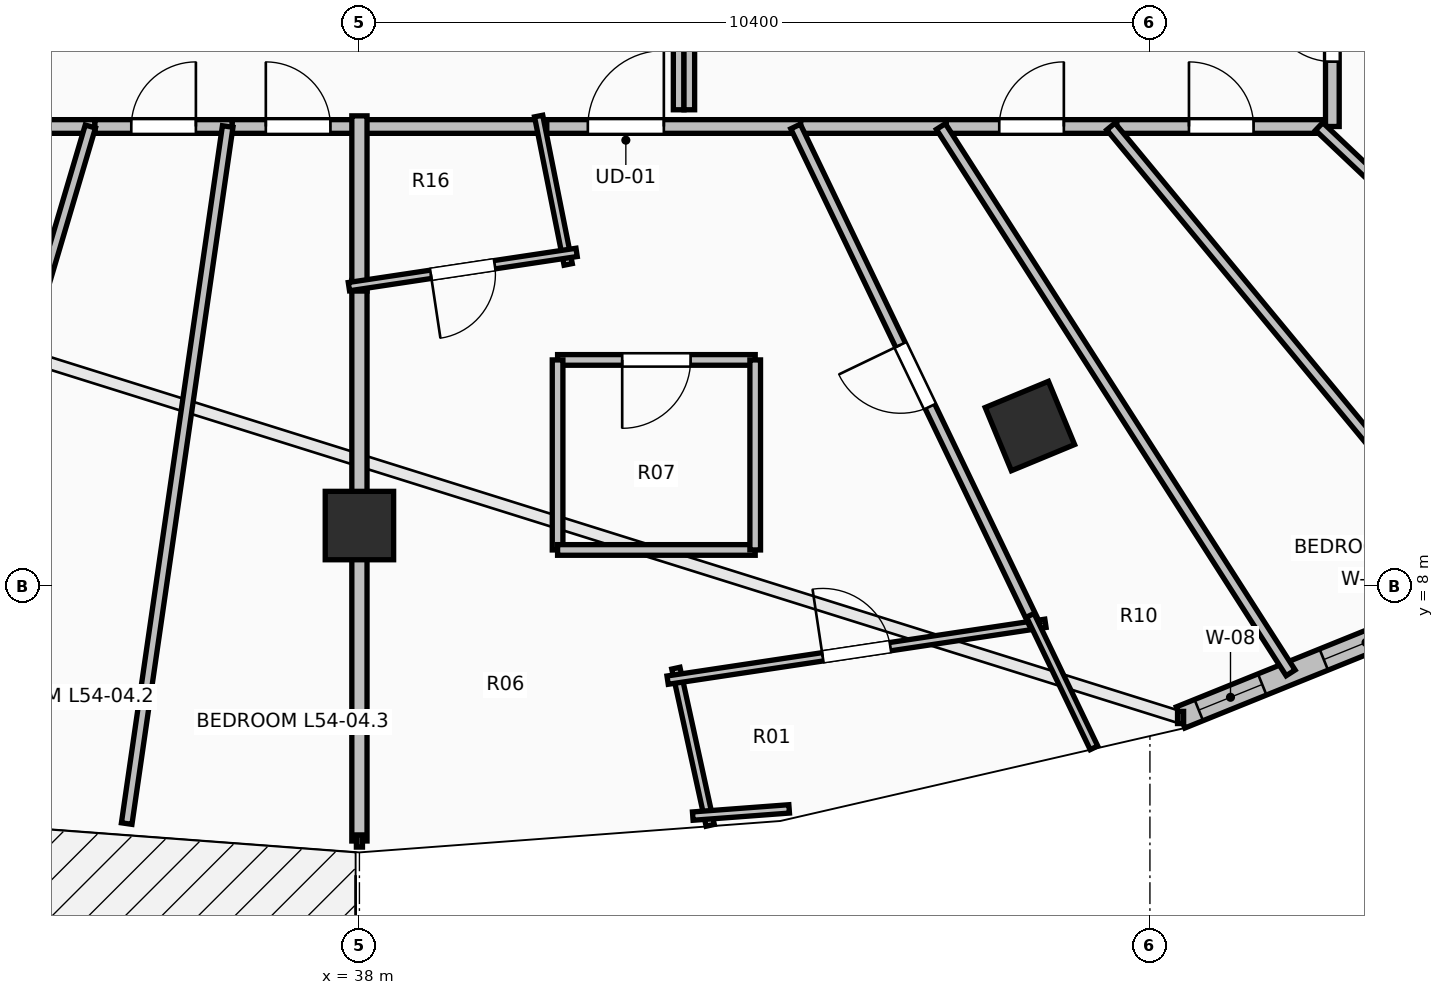
"""IFC4 building model, lengths in metres.
Left out: names, types, materials, properties, quantities, classifications, styles, units other than length and angle.
Written with IfcOpenShell. Run it as: python <this file> out.ifc"""

import sys

from ifc_helpers import new_model, si_unit, direction, frame, frame_2d, origin, origin_2d, place, context, subcontext, project, spatial, rectangle, extrude, element, fill, save


model = new_model("IFC4")
c1 = context("Model", 3, precision=1e-05, world=origin(), true_north=direction((0.0, 1.0)))
c2 = subcontext(c1, "Body", "Model", "MODEL_VIEW")
j1 = project(units=[si_unit("LENGTHUNIT", "METRE"), si_unit("PLANEANGLEUNIT", "RADIAN")], contexts=[c1])
p1 = place(None, origin())
s1 = spatial("IfcSite", under=j1, at=p1, CompositionType="ELEMENT")
p2 = place(p1, origin())
s2 = spatial("IfcBuilding", under=s1, at=p2, CompositionType="ELEMENT")
p3 = place(p2, frame((0.0, 0.0, 200.1)))
s3 = spatial("IfcBuildingStorey", under=s2, at=p3, CompositionType="ELEMENT", Elevation=200.1)
for number, where, z_axis, x_axis in (
    (1, (38.0, 8.8, 0.0), (0.0, 0.0, 1.0), (0.0, -1.0, 0.0)),
    (2, (46.821, 10.109, 0.0), (0.0, 0.0, 1.0), (0.383, -0.924, 0.0)),
):
    element("IfcColumn", number, at=place(p3, frame(where, z_axis=z_axis, x_axis=x_axis)), inside=s3, PredefinedType="COLUMN", context=c2, shape_type="SweptSolid", body=[
        extrude(rectangle(XDim=0.9, YDim=0.9, at=origin_2d()), origin(), (0.0, 0.0, 1.0), 3.55),
    ])
p4 = place(p3, frame((48.803, 6.275, 0.0), z_axis=(0.0, 0.0, 1.0), x_axis=(0.927111094334, 0.374786630981, 0.0)))
e3 = element("IfcWall", 3, at=p4, inside=s3, PredefinedType="STANDARD", context=c2, shape_type="SweptSolid", body=[
    extrude(rectangle(XDim=5.264, YDim=0.3, at=frame_2d((2.632, 0.0))), origin(), (0.0, 0.0, 1.0), 3.29),
])
p5 = place(p4, frame((0.258, 0.0, 0.85)))
e4 = element("IfcOpeningElement", 4, at=p5, cuts=e3, PredefinedType="OPENING", context=c2, shape_type="SweptSolid", body=[
    extrude(rectangle(XDim=0.9, YDim=1.8, at=frame_2d((0.45, 0.9))), frame((0.0, 0.165, 0.0), z_axis=(0.0, -1.0, 0.0), x_axis=(1.0, 0.0, 0.0)), (0.0, 0.0, 1.0), 0.33),
])
p6 = place(p4, frame((2.032, 0.0, 0.85)))
e5 = element("IfcOpeningElement", 5, at=p6, cuts=e3, PredefinedType="OPENING", context=c2, shape_type="SweptSolid", body=[
    extrude(rectangle(XDim=1.2, YDim=1.95, at=frame_2d((0.6, 0.975))), frame((0.0, 0.165, 0.0), z_axis=(0.0, -1.0, 0.0), x_axis=(1.0, 0.0, 0.0)), (0.0, 0.0, 1.0), 0.33),
])
p7 = place(p3, frame((32.551, 14.05, 0.0), z_axis=(0.0, 0.0, 1.0), x_axis=(1.0, 0.0, 0.0)))
e6 = element("IfcWall", 6, at=p7, inside=s3, PredefinedType="PARTITIONING", context=c2, shape_type="SweptSolid", body=[
    extrude(rectangle(XDim=1.969, YDim=0.18, at=frame_2d((0.984, 0.0))), origin(), (0.0, 0.0, 1.0), 2.936),
])
p8 = place(p3, frame((34.52, 14.05, 0.0), z_axis=(0.0, 0.0, 1.0), x_axis=(1.0, 0.0, 0.0)))
e7 = element("IfcWall", 7, at=p8, inside=s3, PredefinedType="PARTITIONING", context=c2, shape_type="SweptSolid", body=[
    extrude(rectangle(XDim=1.807, YDim=0.18, at=frame_2d((0.903, 0.0))), origin(), (0.0, 0.0, 1.0), 2.936),
])
p9 = place(p8, frame((0.479, 0.0, 0.0)))
e8 = element("IfcOpeningElement", 8, at=p9, cuts=e7, PredefinedType="OPENING", context=c2, shape_type="SweptSolid", body=[
    extrude(rectangle(XDim=0.85, YDim=2.1, at=frame_2d((0.425, 1.05))), frame((0.0, 0.105, 0.0), z_axis=(0.0, -1.0, 0.0), x_axis=(1.0, 0.0, 0.0)), (0.0, 0.0, 1.0), 0.21),
])
p10 = place(p3, frame((36.327, 14.05, 0.0), z_axis=(0.0, 0.0, 1.0), x_axis=(1.0, 0.0, 0.0)))
e9 = element("IfcWall", 9, at=p10, inside=s3, PredefinedType="PARTITIONING", context=c2, shape_type="SweptSolid", body=[
    extrude(rectangle(XDim=1.733, YDim=0.18, at=frame_2d((0.867, 0.0))), origin(), (0.0, 0.0, 1.0), 2.936),
])
p11 = place(p10, frame((0.441, 0.0, 0.0)))
e10 = element("IfcOpeningElement", 10, at=p11, cuts=e9, PredefinedType="OPENING", context=c2, shape_type="SweptSolid", body=[
    extrude(rectangle(XDim=0.85, YDim=2.1, at=frame_2d((0.425, 1.05))), frame((0.0, 0.105, 0.0), z_axis=(0.0, -1.0, 0.0), x_axis=(1.0, 0.0, 0.0)), (0.0, 0.0, 1.0), 0.21),
])
p12 = place(p3, frame((40.325, 14.05, 0.0), z_axis=(0.0, 0.0, 1.0), x_axis=(1.0, 0.0, 0.0)))
e11 = element("IfcWall", 11, at=p12, inside=s3, PredefinedType="PARTITIONING", context=c2, shape_type="SweptSolid", body=[
    extrude(rectangle(XDim=3.48, YDim=0.18, at=frame_2d((1.74, 0.0))), origin(), (0.0, 0.0, 1.0), 2.936),
])
p13 = place(p12, frame((0.68, 0.0, 0.0)))
e12 = element("IfcOpeningElement", 12, at=p13, cuts=e11, PredefinedType="OPENING", context=c2, shape_type="SweptSolid", body=[
    extrude(rectangle(XDim=1.0, YDim=2.15, at=frame_2d((0.5, 1.075))), frame((0.0, 0.105, 0.0), z_axis=(0.0, -1.0, 0.0), x_axis=(1.0, 0.0, 0.0)), (0.0, 0.0, 1.0), 0.21),
])
p14 = place(p3, frame((37.92, 14.05, 0.0), z_axis=(0.0, 0.0, 1.0), x_axis=(1.0, 0.0, 0.0)))
e13 = element("IfcWall", 13, at=p14, inside=s3, PredefinedType="PARTITIONING", context=c2, shape_type="SweptSolid", body=[
    extrude(rectangle(XDim=2.545, YDim=0.18, at=frame_2d((1.272, 0.0))), origin(), (0.0, 0.0, 1.0), 2.936),
])
p15 = place(p3, frame((43.805, 14.05, 0.0), z_axis=(0.0, 0.0, 1.0), x_axis=(1.0, 0.0, 0.0)))
e14 = element("IfcWall", 14, at=p15, inside=s3, PredefinedType="PARTITIONING", context=c2, shape_type="SweptSolid", body=[
    extrude(rectangle(XDim=1.916, YDim=0.18, at=frame_2d((0.958, 0.0))), origin(), (0.0, 0.0, 1.0), 2.482),
])
p16 = place(p3, frame((45.721, 14.05, 0.0), z_axis=(0.0, 0.0, 1.0), x_axis=(1.0, 0.0, 0.0)))
e15 = element("IfcWall", 15, at=p16, inside=s3, PredefinedType="PARTITIONING", context=c2, shape_type="SweptSolid", body=[
    extrude(rectangle(XDim=2.243, YDim=0.18, at=frame_2d((1.122, 0.0))), origin(), (0.0, 0.0, 1.0), 2.482),
])
p17 = place(p16, frame((0.697, 0.0, 0.0)))
e16 = element("IfcOpeningElement", 16, at=p17, cuts=e15, PredefinedType="OPENING", context=c2, shape_type="SweptSolid", body=[
    extrude(rectangle(XDim=0.85, YDim=2.1, at=frame_2d((0.425, 1.05))), frame((0.0, 0.105, 0.0), z_axis=(0.0, -1.0, 0.0), x_axis=(1.0, 0.0, 0.0)), (0.0, 0.0, 1.0), 0.21),
])
p18 = place(p3, frame((47.964, 14.05, 0.0), z_axis=(0.0, 0.0, 1.0), x_axis=(1.0, 0.0, 0.0)))
e17 = element("IfcWall", 17, at=p18, inside=s3, PredefinedType="PARTITIONING", context=c2, shape_type="SweptSolid", body=[
    extrude(rectangle(XDim=2.749, YDim=0.18, at=frame_2d((1.375, 0.0))), origin(), (0.0, 0.0, 1.0), 2.482),
])
p19 = place(p18, frame((0.949, 0.0, 0.0)))
e18 = element("IfcOpeningElement", 18, at=p19, cuts=e17, PredefinedType="OPENING", context=c2, shape_type="SweptSolid", body=[
    extrude(rectangle(XDim=0.85, YDim=2.1, at=frame_2d((0.425, 1.05))), frame((0.0, 0.105, 0.0), z_axis=(0.0, -1.0, 0.0), x_axis=(1.0, 0.0, 0.0)), (0.0, 0.0, 1.0), 0.21),
])
p20 = place(p3, frame((50.8, 14.05, 0.0), z_axis=(0.0, 0.0, 1.0), x_axis=(0.0, 1.0, 0.0)))
e19 = element("IfcWall", 19, at=p20, inside=s3, PredefinedType="PARTITIONING", context=c2, shape_type="SweptSolid", body=[
    extrude(rectangle(XDim=2.556, YDim=0.18, at=frame_2d((1.278, 0.0))), origin(), (0.0, 0.0, 1.0), 2.482),
])
p21 = place(p20, frame((0.853, 0.0, 0.0)))
e20 = element("IfcOpeningElement", 20, at=p21, cuts=e19, PredefinedType="OPENING", context=c2, shape_type="SweptSolid", body=[
    extrude(rectangle(XDim=0.85, YDim=2.1, at=frame_2d((0.425, 1.05))), frame((0.0, 0.105, 0.0), z_axis=(0.0, -1.0, 0.0), x_axis=(1.0, 0.0, 0.0)), (0.0, 0.0, 1.0), 0.21),
])
p22 = place(p3, frame((31.842, 5.21, 0.0), z_axis=(0.0, 0.0, 1.0), x_axis=(0.283952183478, 0.958838441813, 0.0)))
e21 = element("IfcWall", 21, at=p22, inside=s3, PredefinedType="PARTITIONING", context=c2, shape_type="SweptSolid", body=[
    extrude(rectangle(XDim=9.219, YDim=0.14, at=frame_2d((4.61, 0.0))), origin(), (0.0, 0.0, 1.0), 2.824),
])
p23 = place(p3, frame((34.938, 4.879, 0.0), z_axis=(0.0, 0.0, 1.0), x_axis=(0.143423836858, 0.989661357749, 0.0)))
e22 = element("IfcWall", 22, at=p23, inside=s3, PredefinedType="PARTITIONING", context=c2, shape_type="SweptSolid", body=[
    extrude(rectangle(XDim=9.267, YDim=0.14, at=frame_2d((4.633, 0.0))), origin(), (0.0, 0.0, 1.0), 2.824),
])
p24 = place(p3, frame((38.0, 4.65, 0.0), z_axis=(0.0, 0.0, 1.0), x_axis=(0.0, 1.0, 0.0)))
e23 = element("IfcWall", 23, at=p24, inside=s3, PredefinedType="PARTITIONING", context=c2, shape_type="SweptSolid", body=[
    extrude(rectangle(XDim=7.375, YDim=0.2, at=frame_2d((3.688, 0.0))), origin(), (0.0, 0.0, 1.0), 3.022),
])
p25 = place(p3, frame((38.0, 11.885, 0.0), z_axis=(0.0, 0.0, 1.0), x_axis=(0.0, 1.0, 0.0)))
e24 = element("IfcWall", 24, at=p25, inside=s3, PredefinedType="PARTITIONING", context=c2, shape_type="SweptSolid", body=[
    extrude(rectangle(XDim=2.305, YDim=0.2, at=frame_2d((1.152, 0.0))), origin(), (0.0, 0.0, 1.0), 2.936),
])
p26 = place(p3, frame((40.358, 14.187, 0.0), z_axis=(0.0, 0.0, 1.0), x_axis=(0.195313900905, -0.980740781304, 0.0)))
e25 = element("IfcWall", 25, at=p26, inside=s3, PredefinedType="PARTITIONING", context=c2, shape_type="SweptSolid", body=[
    extrude(rectangle(XDim=1.99, YDim=0.11, at=frame_2d((0.995, 0.0))), origin(), (0.0, 0.0, 1.0), 2.936),
])
p27 = place(p3, frame((40.857, 12.394, 0.0), z_axis=(0.0, 0.0, 1.0), x_axis=(-0.988873015636, -0.148762088409, 0.0)))
e26 = element("IfcWall", 26, at=p27, inside=s3, PredefinedType="PARTITIONING", context=c2, shape_type="SweptSolid", body=[
    extrude(rectangle(XDim=3.03, YDim=0.11, at=frame_2d((1.515, 0.0))), origin(), (0.0, 0.0, 1.0), 3.29),
])
p28 = place(p27, frame((1.09, 0.0, 0.0)))
e27 = element("IfcOpeningElement", 27, at=p28, cuts=e26, PredefinedType="OPENING", context=c2, shape_type="SweptSolid", body=[
    extrude(rectangle(XDim=0.85, YDim=2.1, at=frame_2d((0.425, 1.05))), frame((0.0, 0.07, 0.0), z_axis=(0.0, -1.0, 0.0), x_axis=(1.0, 0.0, 0.0)), (0.0, 0.0, 1.0), 0.14),
])
p29 = place(p3, frame((42.615, 4.856, 0.0), z_axis=(0.0, 0.0, 1.0), x_axis=(-0.213521424511, 0.976938381514, 0.0)))
e28 = element("IfcWall", 28, at=p29, inside=s3, PredefinedType="PARTITIONING", context=c2, shape_type="SweptSolid", body=[
    extrude(rectangle(XDim=2.116, YDim=0.11, at=frame_2d((1.058, 0.0))), origin(), (0.0, 0.0, 1.0), 3.29),
])
p30 = place(p3, frame((42.055, 6.766, 0.0), z_axis=(0.0, 0.0, 1.0), x_axis=(0.988872134662, 0.148767944424, 0.0)))
e29 = element("IfcWall", 29, at=p30, inside=s3, PredefinedType="PARTITIONING", context=c2, shape_type="SweptSolid", body=[
    extrude(rectangle(XDim=5.027, YDim=0.11, at=frame_2d((2.513, 0.0))), origin(), (0.0, 0.0, 1.0), 3.29),
])
p31 = place(p30, frame((2.063, 0.0, 0.0)))
e30 = element("IfcOpeningElement", 30, at=p31, cuts=e29, PredefinedType="OPENING", context=c2, shape_type="SweptSolid", body=[
    extrude(rectangle(XDim=0.9, YDim=2.1, at=frame_2d((0.45, 1.05))), frame((0.0, 0.07, 0.0), z_axis=(0.0, -1.0, 0.0), x_axis=(1.0, 0.0, 0.0)), (0.0, 0.0, 1.0), 0.14),
])
p32 = place(p3, frame((42.385, 4.978, 0.0), z_axis=(0.0, 0.0, 1.0), x_axis=(0.997207179737, 0.074684942803, 0.0)))
e31 = element("IfcWall", 31, at=p32, inside=s3, PredefinedType="PARTITIONING", context=c2, shape_type="SweptSolid", body=[
    extrude(rectangle(XDim=1.272, YDim=0.11, at=frame_2d((0.636, 0.0))), origin(), (0.0, 0.0, 1.0), 3.29),
])
p33 = place(p3, frame((43.207, 10.979, 0.0), z_axis=(0.0, 0.0, 1.0), x_axis=(-1.0, 0.0, 0.0)))
e32 = element("IfcWall", 32, at=p33, inside=s3, PredefinedType="PARTITIONING", context=c2, shape_type="SweptSolid", body=[
    extrude(rectangle(XDim=2.6, YDim=0.14, at=frame_2d((1.3, 0.0))), origin(), (0.0, 0.0, 1.0), 2.482),
])
p34 = place(p33, frame((0.85, 0.0, 0.0)))
e33 = element("IfcOpeningElement", 33, at=p34, cuts=e32, PredefinedType="OPENING", context=c2, shape_type="SweptSolid", body=[
    extrude(rectangle(XDim=0.9, YDim=2.1, at=frame_2d((0.45, 1.05))), frame((0.0, 0.085, 0.0), z_axis=(0.0, -1.0, 0.0), x_axis=(1.0, 0.0, 0.0)), (0.0, 0.0, 1.0), 0.17),
])
p35 = place(p3, frame((40.607, 10.979, 0.0), z_axis=(0.0, 0.0, 1.0), x_axis=(0.0, -1.0, 0.0)))
e34 = element("IfcWall", 34, at=p35, inside=s3, PredefinedType="PARTITIONING", context=c2, shape_type="SweptSolid", body=[
    extrude(rectangle(XDim=2.5, YDim=0.14, at=frame_2d((1.25, 0.0))), origin(), (0.0, 0.0, 1.0), 2.482),
])
p36 = place(p3, frame((40.607, 8.479, 0.0), z_axis=(0.0, 0.0, 1.0), x_axis=(1.0, 0.0, 0.0)))
e35 = element("IfcWall", 35, at=p36, inside=s3, PredefinedType="PARTITIONING", context=c2, shape_type="SweptSolid", body=[
    extrude(rectangle(XDim=2.6, YDim=0.14, at=frame_2d((1.3, 0.0))), origin(), (0.0, 0.0, 1.0), 3.29),
])
p37 = place(p3, frame((43.207, 8.479, 0.0), z_axis=(0.0, 0.0, 1.0), x_axis=(0.0, 1.0, 0.0)))
e36 = element("IfcWall", 36, at=p37, inside=s3, PredefinedType="PARTITIONING", context=c2, shape_type="SweptSolid", body=[
    extrude(rectangle(XDim=2.5, YDim=0.14, at=frame_2d((1.25, 0.0))), origin(), (0.0, 0.0, 1.0), 2.824),
])
p38 = place(p3, frame((46.887, 7.493, 0.0), z_axis=(0.0, 0.0, 1.0), x_axis=(-0.43289909466, 0.901442385204, 0.0)))
e37 = element("IfcWall", 37, at=p38, inside=s3, PredefinedType="PARTITIONING", context=c2, shape_type="SweptSolid", body=[
    extrude(rectangle(XDim=7.274, YDim=0.14, at=frame_2d((3.637, 0.0))), origin(), (0.0, 0.0, 1.0), 2.482),
])
p39 = place(p38, frame((3.187, 0.0, 0.0)))
e38 = element("IfcOpeningElement", 38, at=p39, cuts=e37, PredefinedType="OPENING", context=c2, shape_type="SweptSolid", body=[
    extrude(rectangle(XDim=0.9, YDim=2.1, at=frame_2d((0.45, 1.05))), frame((0.0, 0.085, 0.0), z_axis=(0.0, -1.0, 0.0), x_axis=(1.0, 0.0, 0.0)), (0.0, 0.0, 1.0), 0.17),
])
p40 = place(p3, frame((47.664, 5.876, 0.0), z_axis=(0.0, 0.0, 1.0), x_axis=(-0.432866492457, 0.901458041014, 0.0)))
e39 = element("IfcWall", 39, at=p40, inside=s3, PredefinedType="PARTITIONING", context=c2, shape_type="SweptSolid", body=[
    extrude(rectangle(XDim=1.934, YDim=0.11, at=frame_2d((0.967, 0.0))), origin(), (0.0, 0.0, 1.0), 3.29),
])
p41 = place(p3, frame((50.251, 6.862, 0.0), z_axis=(0.0, 0.0, 1.0), x_axis=(-0.539117012224, 0.842230875194, 0.0)))
e40 = element("IfcWall", 40, at=p41, inside=s3, PredefinedType="PARTITIONING", context=c2, shape_type="SweptSolid", body=[
    extrude(rectangle(XDim=8.534, YDim=0.14, at=frame_2d((4.267, 0.0))), origin(), (0.0, 0.0, 1.0), 2.482),
])
p42 = place(p3, frame((52.934, 7.948, 0.0), z_axis=(0.0, 0.0, 1.0), x_axis=(-0.637427009283, 0.77051074479, 0.0)))
e41 = element("IfcWall", 41, at=p42, inside=s3, PredefinedType="PARTITIONING", context=c2, shape_type="SweptSolid", body=[
    extrude(rectangle(XDim=7.919, YDim=0.14, at=frame_2d((3.96, 0.0))), origin(), (0.0, 0.0, 1.0), 2.482),
])
p43 = place(p3, frame((55.538, 9.401, 0.0), z_axis=(0.0, 0.0, 1.0), x_axis=(-0.726277952769, 0.687401145854, 0.0)))
e42 = element("IfcWall", 42, at=p43, inside=s3, PredefinedType="PARTITIONING", context=c2, shape_type="SweptSolid", body=[
    extrude(rectangle(XDim=6.763, YDim=0.14, at=frame_2d((3.382, 0.0))), origin(), (0.0, 0.0, 1.0), 2.824),
])
p44 = place(p3, frame((58.174, 11.099, 0.0), z_axis=(0.0, 0.0, 1.0), x_axis=(-0.804363169868, 0.594137939338, 0.0)))
e43 = element("IfcWall", 43, at=p44, inside=s3, PredefinedType="PARTITIONING", context=c2, shape_type="SweptSolid", body=[
    extrude(rectangle(XDim=9.167, YDim=0.14, at=frame_2d((4.584, 0.0))), origin(), (0.0, 0.0, 1.0), 2.482),
])
p45 = place(p3, frame((60.524, 13.269, 0.0), z_axis=(0.0, 0.0, 1.0), x_axis=(-0.870572608778, 0.49203997078, 0.0)))
e44 = element("IfcWall", 44, at=p45, inside=s3, PredefinedType="PARTITIONING", context=c2, shape_type="SweptSolid", body=[
    extrude(rectangle(XDim=11.169, YDim=0.14, at=frame_2d((5.585, 0.0))), origin(), (0.0, 0.0, 1.0), 2.824),
])
for number, where, z_axis, x_axis in (
    (45, (42.2, 16.1, 0.0), (0.0, 0.0, 1.0), (0.0, -1.0, 0.0)),
    (46, (42.34, 14.27, 0.0), (0.0, 0.0, 1.0), (0.0, 1.0, 0.0)),
):
    element("IfcWall", number, at=place(p3, frame(where, z_axis=z_axis, x_axis=x_axis)), inside=s3, PredefinedType="PARTITIONING", context=c2, shape_type="SweptSolid", body=[
        extrude(rectangle(XDim=1.83, YDim=0.14, at=frame_2d((0.915, 0.0))), origin(), (0.0, 0.0, 1.0), 3.29),
    ])
p46 = place(p5, origin())
e47 = element("IfcWindow", 47, at=p46, inside=s3, PartitioningType="SINGLE_PANEL", PredefinedType="WINDOW", context=c2, shape_type="SweptSolid", body=[
    extrude(rectangle(XDim=0.9, YDim=1.8, at=frame_2d((0.45, 0.9))), frame((0.0, 0.03, 0.0), z_axis=(0.0, -1.0, 0.0), x_axis=(1.0, 0.0, 0.0)), (0.0, 0.0, 1.0), 0.06),
])
fill(e4, e47)
p47 = place(p6, origin())
e48 = element("IfcWindow", 48, at=p47, inside=s3, PartitioningType="SINGLE_PANEL", PredefinedType="WINDOW", context=c2, shape_type="SweptSolid", body=[
    extrude(rectangle(XDim=1.2, YDim=1.95, at=frame_2d((0.6, 0.975))), frame((0.0, 0.03, 0.0), z_axis=(0.0, -1.0, 0.0), x_axis=(1.0, 0.0, 0.0)), (0.0, 0.0, 1.0), 0.06),
])
fill(e5, e48)
p48 = place(p13, origin())
e49 = element("IfcDoor", 49, at=p48, inside=s3, OperationType="SINGLE_SWING_RIGHT", PredefinedType="DOOR", context=c2, shape_type="SweptSolid", body=[
    extrude(rectangle(XDim=1.0, YDim=2.15, at=frame_2d((0.5, 1.075))), frame((0.0, 0.025, 0.0), z_axis=(0.0, -1.0, 0.0), x_axis=(1.0, 0.0, 0.0)), (0.0, 0.0, 1.0), 0.05),
])
fill(e12, e49)
p49 = place(p28, origin())
e50 = element("IfcDoor", 50, at=p49, inside=s3, OperationType="SINGLE_SWING_RIGHT", PredefinedType="DOOR", context=c2, shape_type="SweptSolid", body=[
    extrude(rectangle(XDim=0.85, YDim=2.1, at=frame_2d((0.425, 1.05))), frame((0.0, 0.025, 0.0), z_axis=(0.0, -1.0, 0.0), x_axis=(1.0, 0.0, 0.0)), (0.0, 0.0, 1.0), 0.05),
])
fill(e27, e50)
p50 = place(p31, origin())
e51 = element("IfcDoor", 51, at=p50, inside=s3, OperationType="SINGLE_SWING_LEFT", PredefinedType="DOOR", context=c2, shape_type="SweptSolid", body=[
    extrude(rectangle(XDim=0.9, YDim=2.1, at=frame_2d((0.45, 1.05))), frame((0.0, 0.025, 0.0), z_axis=(0.0, -1.0, 0.0), x_axis=(1.0, 0.0, 0.0)), (0.0, 0.0, 1.0), 0.05),
])
fill(e30, e51)
p51 = place(p34, origin())
e52 = element("IfcDoor", 52, at=p51, inside=s3, OperationType="SINGLE_SWING_RIGHT", PredefinedType="DOOR", context=c2, shape_type="SweptSolid", body=[
    extrude(rectangle(XDim=0.9, YDim=2.1, at=frame_2d((0.45, 1.05))), frame((0.0, 0.025, 0.0), z_axis=(0.0, -1.0, 0.0), x_axis=(1.0, 0.0, 0.0)), (0.0, 0.0, 1.0), 0.05),
])
fill(e33, e52)
p52 = place(p39, origin())
e53 = element("IfcDoor", 53, at=p52, inside=s3, OperationType="SINGLE_SWING_RIGHT", PredefinedType="DOOR", context=c2, shape_type="SweptSolid", body=[
    extrude(rectangle(XDim=0.9, YDim=2.1, at=frame_2d((0.45, 1.05))), frame((0.0, 0.025, 0.0), z_axis=(0.0, -1.0, 0.0), x_axis=(1.0, 0.0, 0.0)), (0.0, 0.0, 1.0), 0.05),
])
fill(e38, e53)
p53 = place(p9, origin())
e54 = element("IfcDoor", 54, at=p53, inside=s3, OperationType="SINGLE_SWING_RIGHT", PredefinedType="DOOR", context=c2, shape_type="SweptSolid", body=[
    extrude(rectangle(XDim=0.85, YDim=2.1, at=frame_2d((0.425, 1.05))), frame((0.0, 0.025, 0.0), z_axis=(0.0, -1.0, 0.0), x_axis=(1.0, 0.0, 0.0)), (0.0, 0.0, 1.0), 0.05),
])
fill(e8, e54)
p54 = place(p11, origin())
e55 = element("IfcDoor", 55, at=p54, inside=s3, OperationType="SINGLE_SWING_LEFT", PredefinedType="DOOR", context=c2, shape_type="SweptSolid", body=[
    extrude(rectangle(XDim=0.85, YDim=2.1, at=frame_2d((0.425, 1.05))), frame((0.0, 0.025, 0.0), z_axis=(0.0, -1.0, 0.0), x_axis=(1.0, 0.0, 0.0)), (0.0, 0.0, 1.0), 0.05),
])
fill(e10, e55)
p55 = place(p17, origin())
e56 = element("IfcDoor", 56, at=p55, inside=s3, OperationType="SINGLE_SWING_RIGHT", PredefinedType="DOOR", context=c2, shape_type="SweptSolid", body=[
    extrude(rectangle(XDim=0.85, YDim=2.1, at=frame_2d((0.425, 1.05))), frame((0.0, 0.025, 0.0), z_axis=(0.0, -1.0, 0.0), x_axis=(1.0, 0.0, 0.0)), (0.0, 0.0, 1.0), 0.05),
])
fill(e16, e56)
p56 = place(p19, origin())
e57 = element("IfcDoor", 57, at=p56, inside=s3, OperationType="SINGLE_SWING_LEFT", PredefinedType="DOOR", context=c2, shape_type="SweptSolid", body=[
    extrude(rectangle(XDim=0.85, YDim=2.1, at=frame_2d((0.425, 1.05))), frame((0.0, 0.025, 0.0), z_axis=(0.0, -1.0, 0.0), x_axis=(1.0, 0.0, 0.0)), (0.0, 0.0, 1.0), 0.05),
])
fill(e18, e57)
p57 = place(p21, origin())
e58 = element("IfcDoor", 58, at=p57, inside=s3, OperationType="SINGLE_SWING_RIGHT", PredefinedType="DOOR", context=c2, shape_type="SweptSolid", body=[
    extrude(rectangle(XDim=0.85, YDim=2.1, at=frame_2d((0.425, 1.05))), frame((0.0, 0.025, 0.0), z_axis=(0.0, -1.0, 0.0), x_axis=(1.0, 0.0, 0.0)), (0.0, 0.0, 1.0), 0.05),
])
fill(e20, e58)
save(model, sys.argv[1])
